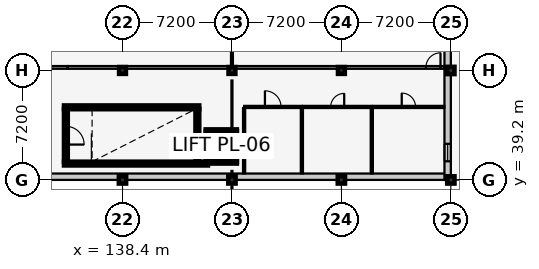
"""IFC4 building model, lengths in metres.
Left out: names, types, materials, properties, quantities, classifications, styles, units other than length and angle.
Written with IfcOpenShell. Run it as: python <this file> out.ifc"""

import sys

from ifc_helpers import new_model, si_unit, direction, frame, frame_2d, origin, origin_2d, place, context, subcontext, project, spatial, rectangle, extrude, element, fill, save


model = new_model("IFC4")
c1 = context("Model", 3, precision=1e-05, world=origin(), true_north=direction((0.0, 1.0)))
c2 = subcontext(c1, "Body", "Model", "MODEL_VIEW")
j1 = project(units=[si_unit("LENGTHUNIT", "METRE"), si_unit("PLANEANGLEUNIT", "RADIAN")], contexts=[c1])
p1 = place(None, origin())
s1 = spatial("IfcSite", under=j1, at=p1, CompositionType="ELEMENT")
p2 = place(p1, origin())
s2 = spatial("IfcBuilding", under=s1, at=p2, CompositionType="ELEMENT")
p3 = place(p2, frame((0.0, 0.0, 13.8)))
s3 = spatial("IfcBuildingStorey", under=s2, at=p3, CompositionType="ELEMENT", Elevation=13.8)
p4 = place(p3, frame((138.4, 39.2, 0.0), z_axis=(0.0, 0.0, 1.0), x_axis=(1.0, 0.0, 0.0)))
e1 = element("IfcColumn", 1, at=p4, inside=s3, PredefinedType="COLUMN", context=c2, shape_type="SweptSolid", body=[
    extrude(rectangle(XDim=0.48, YDim=0.48, at=origin_2d()), origin(), (0.0, 0.0, 1.0), 4.2),
])
p5 = place(p3, frame((138.4, 46.4, 0.0), z_axis=(0.0, 0.0, 1.0), x_axis=(1.0, 0.0, 0.0)))
e2 = element("IfcColumn", 2, at=p5, inside=s3, PredefinedType="COLUMN", context=c2, shape_type="SweptSolid", body=[
    extrude(rectangle(XDim=0.45, YDim=0.45, at=origin_2d()), origin(), (0.0, 0.0, 1.0), 4.2),
])
p6 = place(p3, frame((145.6, 39.2, 0.0), z_axis=(0.0, 0.0, 1.0), x_axis=(1.0, 0.0, 0.0)))
e3 = element("IfcColumn", 3, at=p6, inside=s3, PredefinedType="COLUMN", context=c2, shape_type="SweptSolid", body=[
    extrude(rectangle(XDim=0.48, YDim=0.48, at=origin_2d()), origin(), (0.0, 0.0, 1.0), 4.2),
])
p7 = place(p3, frame((145.6, 46.4, 0.0), z_axis=(0.0, 0.0, 1.0), x_axis=(1.0, 0.0, 0.0)))
e4 = element("IfcColumn", 4, at=p7, inside=s3, PredefinedType="COLUMN", context=c2, shape_type="SweptSolid", body=[
    extrude(rectangle(XDim=0.45, YDim=0.45, at=origin_2d()), origin(), (0.0, 0.0, 1.0), 4.2),
])
p8 = place(p3, frame((152.8, 39.2, 0.0), z_axis=(0.0, 0.0, 1.0), x_axis=(1.0, 0.0, 0.0)))
e5 = element("IfcColumn", 5, at=p8, inside=s3, PredefinedType="COLUMN", context=c2, shape_type="SweptSolid", body=[
    extrude(rectangle(XDim=0.48, YDim=0.48, at=origin_2d()), origin(), (0.0, 0.0, 1.0), 4.2),
])
p9 = place(p3, frame((152.8, 46.4, 0.0), z_axis=(0.0, 0.0, 1.0), x_axis=(1.0, 0.0, 0.0)))
e6 = element("IfcColumn", 6, at=p9, inside=s3, PredefinedType="COLUMN", context=c2, shape_type="SweptSolid", body=[
    extrude(rectangle(XDim=0.45, YDim=0.45, at=origin_2d()), origin(), (0.0, 0.0, 1.0), 4.2),
])
for number, where, z_axis, x_axis in (
    (7, (160.0, 39.2, 0.0), (0.0, 0.0, 1.0), (1.0, 0.0, 0.0)),
    (8, (160.0, 46.4, 0.0), (0.0, 0.0, 1.0), (1.0, 0.0, 0.0)),
):
    element("IfcColumn", number, at=place(p3, frame(where, z_axis=z_axis, x_axis=x_axis)), inside=s3, PredefinedType="COLUMN", context=c2, shape_type="SweptSolid", body=[
        extrude(rectangle(XDim=0.48, YDim=0.48, at=origin_2d()), origin(), (0.0, 0.0, 1.0), 4.2),
    ])
p10 = place(p3, frame((160.0, 39.41, 0.0), z_axis=(0.0, 0.0, 1.0), x_axis=(-1.0, 0.0, 0.0)))
e9 = element("IfcWall", 9, at=p10, inside=s3, PredefinedType="SOLIDWALL", context=c2, shape_type="SweptSolid", body=[
    extrude(rectangle(XDim=28.8, YDim=0.42, at=frame_2d((14.4, 0.0))), origin(), (0.0, 0.0, 1.0), 3.255),
])
p11 = place(p3, frame((159.79, 60.8, 0.0), z_axis=(0.0, 0.0, 1.0), x_axis=(0.0, -1.0, 0.0)))
e10 = element("IfcWall", 10, at=p11, inside=s3, PredefinedType="SOLIDWALL", context=c2, shape_type="SweptSolid", body=[
    extrude(rectangle(XDim=21.6, YDim=0.42, at=frame_2d((10.8, 0.0))), origin(), (0.0, 0.0, 1.0), 3.215),
])
p12 = place(p11, frame((1.2, 0.0, 0.9)))
e11 = element("IfcOpeningElement", 11, at=p12, cuts=e10, PredefinedType="OPENING", context=c2, shape_type="SweptSolid", body=[
    extrude(rectangle(XDim=1.2, YDim=1.35, at=frame_2d((0.6, 0.675))), frame((0.0, 0.222, 0.0), z_axis=(0.0, -1.0, 0.0), x_axis=(1.0, 0.0, 0.0)), (0.0, 0.0, 1.0), 0.444),
])
p13 = place(p11, frame((4.75, 0.0, 0.9)))
e12 = element("IfcOpeningElement", 12, at=p13, cuts=e10, PredefinedType="OPENING", context=c2, shape_type="SweptSolid", body=[
    extrude(rectangle(XDim=1.3, YDim=1.35, at=frame_2d((0.65, 0.675))), frame((0.0, 0.222, 0.0), z_axis=(0.0, -1.0, 0.0), x_axis=(1.0, 0.0, 0.0)), (0.0, 0.0, 1.0), 0.444),
])
p14 = place(p11, frame((8.3, 0.0, 0.9)))
e13 = element("IfcOpeningElement", 13, at=p14, cuts=e10, PredefinedType="OPENING", context=c2, shape_type="SweptSolid", body=[
    extrude(rectangle(XDim=1.4, YDim=1.35, at=frame_2d((0.7, 0.675))), frame((0.0, 0.222, 0.0), z_axis=(0.0, -1.0, 0.0), x_axis=(1.0, 0.0, 0.0)), (0.0, 0.0, 1.0), 0.444),
])
p15 = place(p11, frame((12.125, 0.0, 0.9)))
e14 = element("IfcOpeningElement", 14, at=p15, cuts=e10, PredefinedType="OPENING", context=c2, shape_type="SweptSolid", body=[
    extrude(rectangle(XDim=0.95, YDim=1.45, at=frame_2d((0.475, 0.725))), frame((0.0, 0.222, 0.0), z_axis=(0.0, -1.0, 0.0), x_axis=(1.0, 0.0, 0.0)), (0.0, 0.0, 1.0), 0.444),
])
p16 = place(p11, frame((19.225, 0.0, 0.9)))
e15 = element("IfcOpeningElement", 15, at=p16, cuts=e10, PredefinedType="OPENING", context=c2, shape_type="SweptSolid", body=[
    extrude(rectangle(XDim=1.15, YDim=1.45, at=frame_2d((0.575, 0.725))), frame((0.0, 0.222, 0.0), z_axis=(0.0, -1.0, 0.0), x_axis=(1.0, 0.0, 0.0)), (0.0, 0.0, 1.0), 0.444),
])
p17 = place(p3, frame((134.55, 40.275, 0.0), z_axis=(0.0, 0.0, 1.0), x_axis=(1.0, 0.0, 0.0)))
e16 = element("IfcWall", 16, at=p17, inside=s3, PredefinedType="SHEAR", context=c2, shape_type="SweptSolid", body=[
    extrude(rectangle(XDim=9.47, YDim=0.25, at=frame_2d((4.735, 0.0))), origin(), (0.0, 0.0, 1.0), 3.96),
])
p18 = place(p3, frame((143.45, 43.975, 0.0), z_axis=(0.0, 0.0, 1.0), x_axis=(-1.0, 0.0, 0.0)))
e17 = element("IfcWall", 17, at=p18, inside=s3, PredefinedType="SHEAR", context=c2, shape_type="SweptSolid", body=[
    extrude(rectangle(XDim=8.9, YDim=0.25, at=frame_2d((4.45, 0.0))), origin(), (0.0, 0.0, 1.0), 3.96),
])
p19 = place(p3, frame((134.675, 43.85, 0.0), z_axis=(0.0, 0.0, 1.0), x_axis=(0.0, -1.0, 0.0)))
e18 = element("IfcWall", 18, at=p19, inside=s3, PredefinedType="SHEAR", context=c2, shape_type="SweptSolid", body=[
    extrude(rectangle(XDim=3.45, YDim=0.25, at=frame_2d((1.725, 0.0))), origin(), (0.0, 0.0, 1.0), 3.96),
])
p20 = place(p19, frame((1.125, 0.0, 0.0)))
e19 = element("IfcOpeningElement", 19, at=p20, cuts=e18, PredefinedType="OPENING", context=c2, shape_type="SweptSolid", body=[
    extrude(rectangle(XDim=1.2, YDim=2.15, at=frame_2d((0.6, 1.075))), frame((0.0, 0.137, 0.0), z_axis=(0.0, -1.0, 0.0), x_axis=(1.0, 0.0, 0.0)), (0.0, 0.0, 1.0), 0.274),
])
p21 = place(p3, frame((143.325, 40.4, 0.0), z_axis=(0.0, 0.0, 1.0), x_axis=(0.0, 1.0, 0.0)))
e20 = element("IfcWall", 20, at=p21, inside=s3, PredefinedType="SHEAR", context=c2, shape_type="SweptSolid", body=[
    extrude(rectangle(XDim=3.45, YDim=0.25, at=frame_2d((1.725, 0.0))), origin(), (0.0, 0.0, 1.0), 3.96),
])
p22 = place(p3, frame((143.875, 40.4, 0.0), z_axis=(0.0, 0.0, 1.0), x_axis=(1.0, 0.0, 0.0)))
e21 = element("IfcWall", 21, at=p22, inside=s3, PredefinedType="SHEAR", context=c2, shape_type="SweptSolid", body=[
    extrude(rectangle(XDim=2.05, YDim=0.25, at=frame_2d((1.025, 0.0))), origin(), (0.0, 0.0, 1.0), 3.96),
])
p23 = place(p3, frame((145.925, 42.4, 0.0), z_axis=(0.0, 0.0, 1.0), x_axis=(-1.0, 0.0, 0.0)))
e22 = element("IfcWall", 22, at=p23, inside=s3, PredefinedType="SHEAR", context=c2, shape_type="SweptSolid", body=[
    extrude(rectangle(XDim=2.05, YDim=0.25, at=frame_2d((1.025, 0.0))), origin(), (0.0, 0.0, 1.0), 3.96),
])
p24 = place(p23, frame((0.55, 0.0, 0.0)))
e23 = element("IfcOpeningElement", 23, at=p24, cuts=e22, PredefinedType="OPENING", context=c2, shape_type="SweptSolid", body=[
    extrude(rectangle(XDim=0.95, YDim=2.1, at=frame_2d((0.475, 1.05))), frame((0.0, 0.137, 0.0), z_axis=(0.0, -1.0, 0.0), x_axis=(1.0, 0.0, 0.0)), (0.0, 0.0, 1.0), 0.274),
])
for number, where, z_axis, x_axis in (
    (24, (144.0, 42.4, 0.0), (0.0, 0.0, 1.0), (0.0, -1.0, 0.0)),
    (25, (145.8, 40.4, 0.0), (0.0, 0.0, 1.0), (0.0, 1.0, 0.0)),
):
    element("IfcWall", number, at=place(p3, frame(where, z_axis=z_axis, x_axis=x_axis)), inside=s3, PredefinedType="SHEAR", context=c2, shape_type="SweptSolid", body=[
        extrude(rectangle(XDim=2.0, YDim=0.25, at=frame_2d((1.0, 0.0))), origin(), (0.0, 0.0, 1.0), 3.96),
    ])
p25 = place(p3, frame((131.63, 46.6, 0.0), z_axis=(0.0, 0.0, 1.0), x_axis=(1.0, 0.0, 0.0)))
e26 = element("IfcWall", 26, at=p25, inside=s3, PredefinedType="PARTITIONING", context=c2, shape_type="SweptSolid", body=[
    extrude(rectangle(XDim=3.17, YDim=0.18, at=frame_2d((1.585, 0.0))), origin(), (0.0, 0.0, 1.0), 3.235),
])
p26 = place(p25, frame((1.095, 0.0, 0.0)))
e27 = element("IfcOpeningElement", 27, at=p26, cuts=e26, PredefinedType="OPENING", context=c2, shape_type="SweptSolid", body=[
    extrude(rectangle(XDim=0.98, YDim=2.12, at=frame_2d((0.49, 1.06))), frame((0.0, 0.102, 0.0), z_axis=(0.0, -1.0, 0.0), x_axis=(1.0, 0.0, 0.0)), (0.0, 0.0, 1.0), 0.204),
])
p27 = place(p3, frame((134.8, 46.6, 0.0), z_axis=(0.0, 0.0, 1.0), x_axis=(1.0, 0.0, 0.0)))
e28 = element("IfcWall", 28, at=p27, inside=s3, PredefinedType="PARTITIONING", context=c2, shape_type="SweptSolid", body=[
    extrude(rectangle(XDim=24.77, YDim=0.18, at=frame_2d((12.385, 0.0))), origin(), (0.0, 0.0, 1.0), 3.085),
])
p28 = place(p27, frame((23.56, 0.0, 0.0)))
e29 = element("IfcOpeningElement", 29, at=p28, cuts=e28, PredefinedType="OPENING", context=c2, shape_type="SweptSolid", body=[
    extrude(rectangle(XDim=0.96, YDim=2.1, at=frame_2d((0.48, 1.05))), frame((0.0, 0.102, 0.0), z_axis=(0.0, -1.0, 0.0), x_axis=(1.0, 0.0, 0.0)), (0.0, 0.0, 1.0), 0.204),
])
p29 = place(p3, frame((145.6, 46.7, 0.0), z_axis=(0.0, 0.0, 1.0), x_axis=(0.0, 1.0, 0.0)))
e30 = element("IfcWall", 30, at=p29, inside=s3, PredefinedType="PARTITIONING", context=c2, shape_type="SweptSolid", body=[
    extrude(rectangle(XDim=13.67, YDim=0.125, at=frame_2d((6.835, 0.0))), origin(), (0.0, 0.0, 1.0), 3.335),
])
p30 = place(p3, frame((146.4, 44.0, 0.0), z_axis=(0.0, 0.0, 1.0), x_axis=(1.0, 0.0, 0.0)))
e31 = element("IfcWall", 31, at=p30, inside=s3, PredefinedType="PARTITIONING", context=c2, shape_type="SweptSolid", body=[
    extrude(rectangle(XDim=3.8, YDim=0.14, at=frame_2d((1.9, 0.0))), origin(), (0.0, 0.0, 1.0), 3.96),
])
p31 = place(p30, frame((1.37, 0.0, 0.0)))
e32 = element("IfcOpeningElement", 32, at=p31, cuts=e31, PredefinedType="OPENING", context=c2, shape_type="SweptSolid", body=[
    extrude(rectangle(XDim=1.06, YDim=2.1, at=frame_2d((0.53, 1.05))), frame((0.0, 0.082, 0.0), z_axis=(0.0, -1.0, 0.0), x_axis=(1.0, 0.0, 0.0)), (0.0, 0.0, 1.0), 0.164),
])
for number, where, z_axis, x_axis in (
    (33, (146.4, 39.63, 0.0), (0.0, 0.0, 1.0), (0.0, 1.0, 0.0)),
    (34, (150.2, 39.63, 0.0), (0.0, 0.0, 1.0), (0.0, 1.0, 0.0)),
):
    element("IfcWall", number, at=place(p3, frame(where, z_axis=z_axis, x_axis=x_axis)), inside=s3, PredefinedType="PARTITIONING", context=c2, shape_type="SweptSolid", body=[
        extrude(rectangle(XDim=4.29, YDim=0.14, at=frame_2d((2.145, 0.0))), origin(), (0.0, 0.0, 1.0), 3.96),
    ])
p32 = place(p3, frame((150.28, 44.0, 0.0), z_axis=(0.0, 0.0, 1.0), x_axis=(1.0, 0.0, 0.0)))
e35 = element("IfcWall", 35, at=p32, inside=s3, PredefinedType="PARTITIONING", context=c2, shape_type="SweptSolid", body=[
    extrude(rectangle(XDim=4.52, YDim=0.14, at=frame_2d((2.26, 0.0))), origin(), (0.0, 0.0, 1.0), 3.96),
])
p33 = place(p32, frame((1.815, 0.0, 0.0)))
e36 = element("IfcOpeningElement", 36, at=p33, cuts=e35, PredefinedType="OPENING", context=c2, shape_type="SweptSolid", body=[
    extrude(rectangle(XDim=0.89, YDim=2.05, at=frame_2d((0.445, 1.025))), frame((0.0, 0.082, 0.0), z_axis=(0.0, -1.0, 0.0), x_axis=(1.0, 0.0, 0.0)), (0.0, 0.0, 1.0), 0.164),
])
p34 = place(p3, frame((154.8, 39.63, 0.0), z_axis=(0.0, 0.0, 1.0), x_axis=(0.0, 1.0, 0.0)))
e37 = element("IfcWall", 37, at=p34, inside=s3, PredefinedType="PARTITIONING", context=c2, shape_type="SweptSolid", body=[
    extrude(rectangle(XDim=4.29, YDim=0.14, at=frame_2d((2.145, 0.0))), origin(), (0.0, 0.0, 1.0), 3.96),
])
p35 = place(p3, frame((154.88, 44.0, 0.0), z_axis=(0.0, 0.0, 1.0), x_axis=(1.0, 0.0, 0.0)))
e38 = element("IfcWall", 38, at=p35, inside=s3, PredefinedType="PARTITIONING", context=c2, shape_type="SweptSolid", body=[
    extrude(rectangle(XDim=4.69, YDim=0.14, at=frame_2d((2.345, 0.0))), origin(), (0.0, 0.0, 1.0), 3.96),
])
p36 = place(p35, frame((1.89, 0.0, 0.0)))
e39 = element("IfcOpeningElement", 39, at=p36, cuts=e38, PredefinedType="OPENING", context=c2, shape_type="SweptSolid", body=[
    extrude(rectangle(XDim=0.91, YDim=2.06, at=frame_2d((0.455, 1.03))), frame((0.0, 0.082, 0.0), z_axis=(0.0, -1.0, 0.0), x_axis=(1.0, 0.0, 0.0)), (0.0, 0.0, 1.0), 0.164),
])
p37 = place(p16, origin())
e40 = element("IfcWindow", 40, at=p37, inside=s3, PartitioningType="SINGLE_PANEL", PredefinedType="WINDOW", context=c2, shape_type="SweptSolid", body=[
    extrude(rectangle(XDim=1.15, YDim=1.45, at=frame_2d((0.575, 0.725))), frame((0.0, 0.03, 0.0), z_axis=(0.0, -1.0, 0.0), x_axis=(1.0, 0.0, 0.0)), (0.0, 0.0, 1.0), 0.06),
])
fill(e15, e40)
p38 = place(p20, origin())
e41 = element("IfcDoor", 41, at=p38, inside=s3, OperationType="SINGLE_SWING_RIGHT", PredefinedType="DOOR", context=c2, shape_type="SweptSolid", body=[
    extrude(rectangle(XDim=1.2, YDim=2.15, at=frame_2d((0.6, 1.075))), frame((0.0, 0.025, 0.0), z_axis=(0.0, -1.0, 0.0), x_axis=(1.0, 0.0, 0.0)), (0.0, 0.0, 1.0), 0.05),
])
fill(e19, e41)
p39 = place(p24, origin())
e42 = element("IfcDoor", 42, at=p39, inside=s3, OperationType="SLIDING_TO_LEFT", PredefinedType="DOOR", context=c2, shape_type="SweptSolid", body=[
    extrude(rectangle(XDim=0.95, YDim=2.1, at=frame_2d((0.475, 1.05))), frame((0.0, 0.025, 0.0), z_axis=(0.0, -1.0, 0.0), x_axis=(1.0, 0.0, 0.0)), (0.0, 0.0, 1.0), 0.05),
])
fill(e23, e42)
p40 = place(p28, origin())
e43 = element("IfcDoor", 43, at=p40, inside=s3, OperationType="SINGLE_SWING_RIGHT", PredefinedType="DOOR", context=c2, shape_type="SweptSolid", body=[
    extrude(rectangle(XDim=0.96, YDim=2.1, at=frame_2d((0.48, 1.05))), frame((0.0, 0.025, 0.0), z_axis=(0.0, -1.0, 0.0), x_axis=(1.0, 0.0, 0.0)), (0.0, 0.0, 1.0), 0.05),
])
fill(e29, e43)
p41 = place(p31, origin())
e44 = element("IfcDoor", 44, at=p41, inside=s3, OperationType="SINGLE_SWING_LEFT", PredefinedType="DOOR", context=c2, shape_type="SweptSolid", body=[
    extrude(rectangle(XDim=1.06, YDim=2.1, at=frame_2d((0.53, 1.05))), frame((0.0, 0.025, 0.0), z_axis=(0.0, -1.0, 0.0), x_axis=(1.0, 0.0, 0.0)), (0.0, 0.0, 1.0), 0.05),
])
fill(e32, e44)
p42 = place(p33, origin())
e45 = element("IfcDoor", 45, at=p42, inside=s3, OperationType="SINGLE_SWING_RIGHT", PredefinedType="DOOR", context=c2, shape_type="SweptSolid", body=[
    extrude(rectangle(XDim=0.89, YDim=2.05, at=frame_2d((0.445, 1.025))), frame((0.0, 0.025, 0.0), z_axis=(0.0, -1.0, 0.0), x_axis=(1.0, 0.0, 0.0)), (0.0, 0.0, 1.0), 0.05),
])
fill(e36, e45)
p43 = place(p36, origin())
e46 = element("IfcDoor", 46, at=p43, inside=s3, OperationType="SINGLE_SWING_LEFT", PredefinedType="DOOR", context=c2, shape_type="SweptSolid", body=[
    extrude(rectangle(XDim=0.91, YDim=2.06, at=frame_2d((0.455, 1.03))), frame((0.0, 0.025, 0.0), z_axis=(0.0, -1.0, 0.0), x_axis=(1.0, 0.0, 0.0)), (0.0, 0.0, 1.0), 0.05),
])
fill(e39, e46)
save(model, sys.argv[1])
